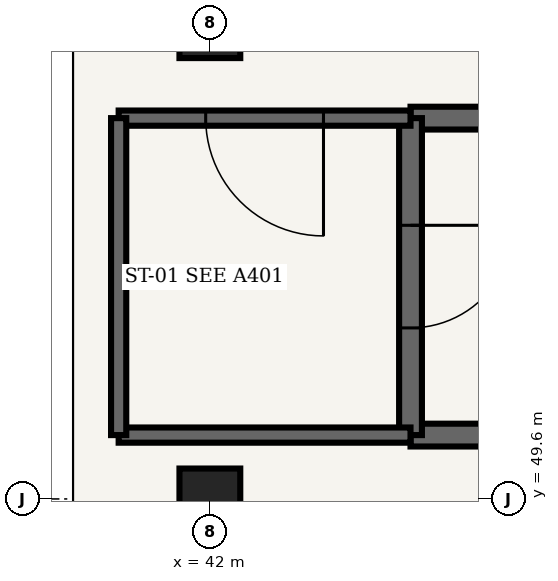
"""IFC4 building model, lengths in metres.
Left out: names, types, materials, properties, quantities, classifications, styles, units other than length and angle.
Written with IfcOpenShell. Run it as: python <this file> out.ifc"""

import sys

from ifc_helpers import new_model, si_unit, direction, frame, frame_2d, origin, origin_2d, place, context, subcontext, project, spatial, rectangle, extrude, element, fill, save


model = new_model("IFC4")
c1 = context("Model", 3, precision=1e-05, world=origin(), true_north=direction((0.0, 1.0)))
c2 = subcontext(c1, "Body", "Model", "MODEL_VIEW")
j1 = project(units=[si_unit("LENGTHUNIT", "METRE"), si_unit("PLANEANGLEUNIT", "RADIAN")], contexts=[c1])
p1 = place(None, origin())
s1 = spatial("IfcSite", under=j1, at=p1, CompositionType="ELEMENT")
p2 = place(p1, origin())
s2 = spatial("IfcBuilding", under=s1, at=p2, CompositionType="ELEMENT")
p3 = place(p2, frame((0.0, 0.0, -5.4)))
s3 = spatial("IfcBuildingStorey", under=s2, at=p3, CompositionType="ELEMENT", Elevation=-5.4)
for number, where, z_axis, x_axis in (
    (1, (42.0, 49.6, -0.4), (0.0, 0.0, 1.0), (1.0, 0.0, 0.0)),
    (2, (42.0, 55.8, -0.4), (0.0, 0.0, 1.0), (1.0, 0.0, 0.0)),
):
    element("IfcColumn", number, at=place(p3, frame(where, z_axis=z_axis, x_axis=x_axis)), inside=s3, PredefinedType="COLUMN", context=c2, shape_type="SweptSolid", body=[
        extrude(rectangle(XDim=0.8, YDim=0.8, at=origin_2d()), origin(), (0.0, 0.0, 1.0), 5.8),
    ])
for number, where, z_axis, x_axis in (
    (3, (44.64, 50.44, -0.4), (0.0, 0.0, 1.0), (1.0, 0.0, 0.0)),
    (4, (53.16, 54.61, -0.4), (0.0, 0.0, 1.0), (-1.0, 0.0, 0.0)),
):
    element("IfcWall", number, at=place(p3, frame(where, z_axis=z_axis, x_axis=x_axis)), inside=s3, PredefinedType="SHEAR", context=c2, shape_type="SweptSolid", body=[
        extrude(rectangle(XDim=8.52, YDim=0.3, at=frame_2d((4.26, 0.0))), origin(), (0.0, 0.0, 1.0), 5.5),
    ])
p4 = place(p3, frame((44.64, 54.61, -0.4), z_axis=(0.0, 0.0, 1.0), x_axis=(0.0, -1.0, 0.0)))
e5 = element("IfcWall", 5, at=p4, inside=s3, PredefinedType="SHEAR", context=c2, shape_type="SweptSolid", body=[
    extrude(rectangle(XDim=4.17, YDim=0.3, at=frame_2d((2.085, 0.0))), origin(), (0.0, 0.0, 1.0), 5.5),
])
p5 = place(p4, frame((1.41, 0.0, 0.4)))
e6 = element("IfcOpeningElement", 6, at=p5, cuts=e5, PredefinedType="OPENING", context=c2, shape_type="SweptSolid", body=[
    extrude(rectangle(XDim=1.35, YDim=2.2, at=frame_2d((0.675, 1.1))), frame((0.0, 0.16, 0.0), z_axis=(0.0, -1.0, 0.0), x_axis=(1.0, 0.0, 0.0)), (0.0, 0.0, 1.0), 0.32),
])
p6 = place(p3, frame((40.8, 50.44, 0.0), z_axis=(0.0, 0.0, 1.0), x_axis=(1.0, 0.0, 0.0)))
e7 = element("IfcWall", 7, at=p6, inside=s3, PredefinedType="SHEAR", context=c2, shape_type="SweptSolid", body=[
    extrude(rectangle(XDim=3.84, YDim=0.2, at=frame_2d((1.92, 0.0))), origin(), (0.0, 0.0, 1.0), 5.1),
])
p7 = place(p3, frame((44.64, 54.61, 0.0), z_axis=(0.0, 0.0, 1.0), x_axis=(-1.0, 0.0, 0.0)))
e8 = element("IfcWall", 8, at=p7, inside=s3, PredefinedType="SHEAR", context=c2, shape_type="SweptSolid", body=[
    extrude(rectangle(XDim=3.84, YDim=0.2, at=frame_2d((1.92, 0.0))), origin(), (0.0, 0.0, 1.0), 5.1),
])
p8 = place(p7, frame((1.145, 0.0, 0.0)))
e9 = element("IfcOpeningElement", 9, at=p8, cuts=e8, PredefinedType="OPENING", context=c2, shape_type="SweptSolid", body=[
    extrude(rectangle(XDim=1.55, YDim=2.2, at=frame_2d((0.775, 1.1))), frame((0.0, 0.11, 0.0), z_axis=(0.0, -1.0, 0.0), x_axis=(1.0, 0.0, 0.0)), (0.0, 0.0, 1.0), 0.22),
])
p9 = place(p3, frame((40.8, 54.61, 0.0), z_axis=(0.0, 0.0, 1.0), x_axis=(0.0, -1.0, 0.0)))
e10 = element("IfcWall", 10, at=p9, inside=s3, PredefinedType="SHEAR", context=c2, shape_type="SweptSolid", body=[
    extrude(rectangle(XDim=4.17, YDim=0.2, at=frame_2d((2.085, 0.0))), origin(), (0.0, 0.0, 1.0), 5.1),
])
p10 = place(p5, origin())
e11 = element("IfcDoor", 11, at=p10, inside=s3, OperationType="SINGLE_SWING_LEFT", PredefinedType="DOOR", context=c2, shape_type="SweptSolid", body=[
    extrude(rectangle(XDim=1.35, YDim=2.2, at=frame_2d((0.675, 1.1))), frame((0.0, 0.025, 0.0), z_axis=(0.0, -1.0, 0.0), x_axis=(1.0, 0.0, 0.0)), (0.0, 0.0, 1.0), 0.05),
])
fill(e6, e11)
p11 = place(p8, origin())
e12 = element("IfcDoor", 12, at=p11, inside=s3, OperationType="SINGLE_SWING_LEFT", PredefinedType="DOOR", context=c2, shape_type="SweptSolid", body=[
    extrude(rectangle(XDim=1.55, YDim=2.2, at=frame_2d((0.775, 1.1))), frame((0.0, 0.025, 0.0), z_axis=(0.0, -1.0, 0.0), x_axis=(1.0, 0.0, 0.0)), (0.0, 0.0, 1.0), 0.05),
])
fill(e9, e12)
save(model, sys.argv[1])
